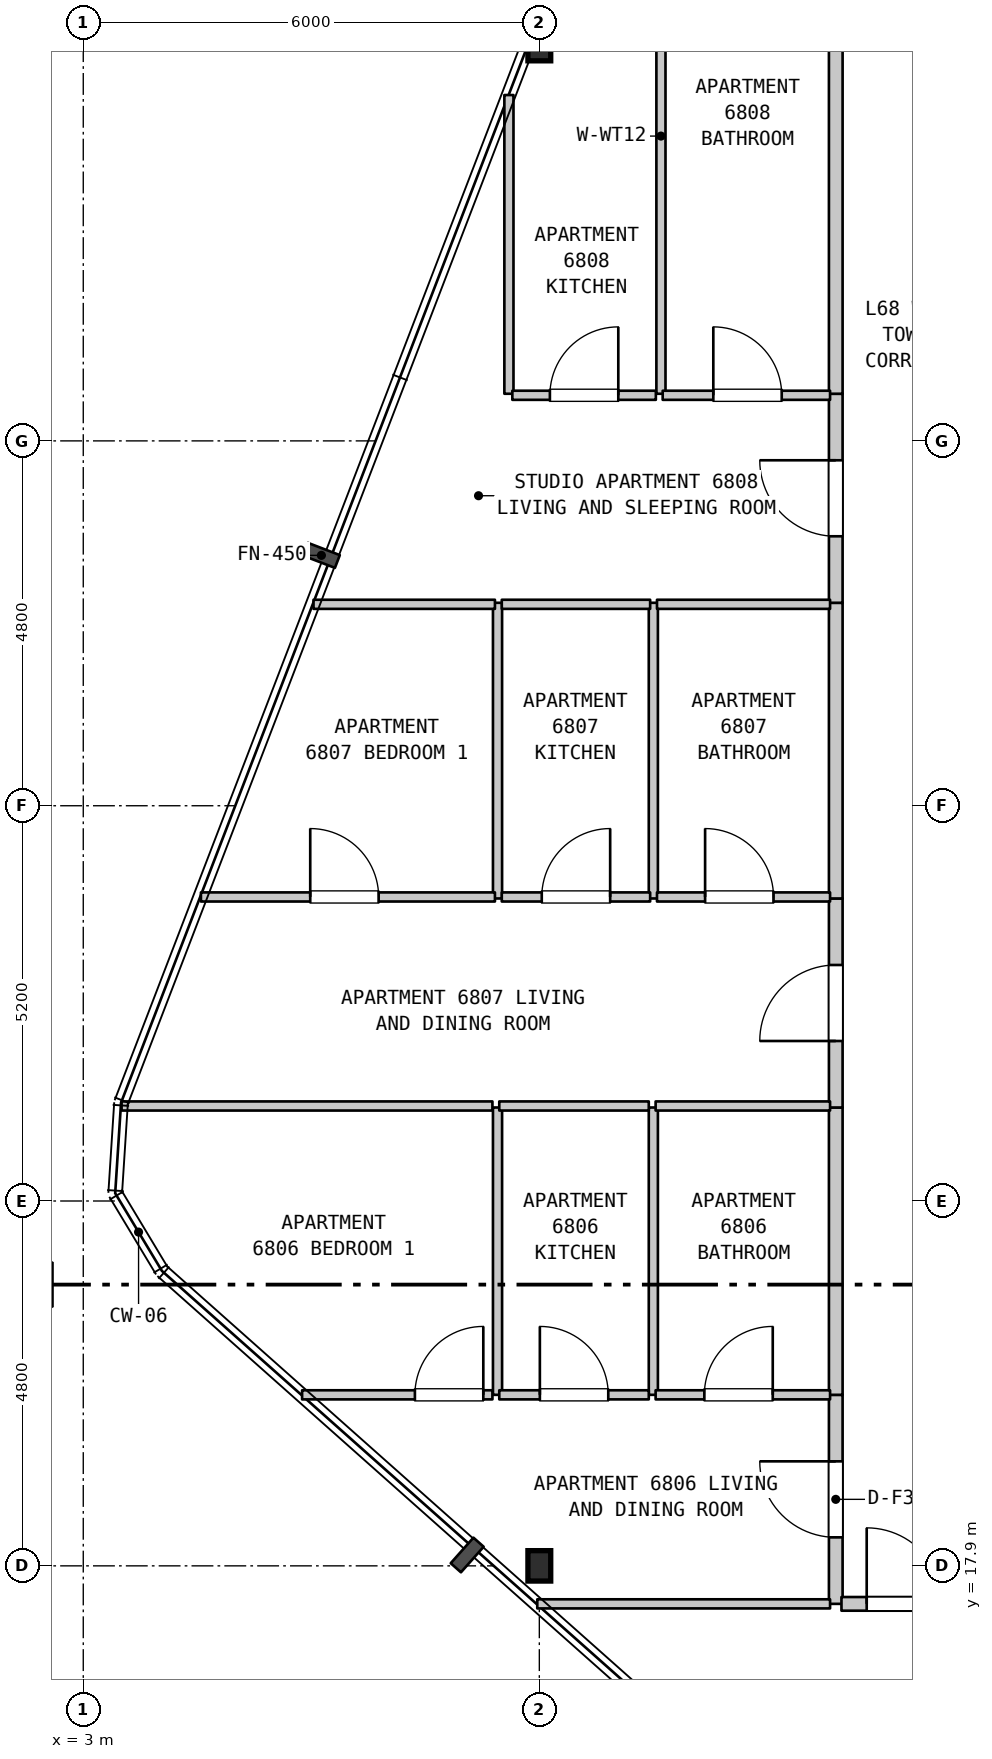
"""IFC4 building model, lengths in metres.
Left out: names, types, materials, properties, quantities, classifications, styles, units other than length and angle.
Written with IfcOpenShell. Run it as: python <this file> out.ifc"""

import sys

from ifc_helpers import new_model, si_unit, direction, frame, frame_2d, origin, origin_2d, place, context, subcontext, project, spatial, rectangle, i_section, extrude, element, fill, save


model = new_model("IFC4")
c1 = context("Model", 3, precision=1e-05, world=origin(), true_north=direction((0.0, 1.0)))
c2 = subcontext(c1, "Body", "Model", "MODEL_VIEW")
j1 = project(units=[si_unit("LENGTHUNIT", "METRE"), si_unit("PLANEANGLEUNIT", "RADIAN")], contexts=[c1])
p1 = place(None, origin())
s1 = spatial("IfcSite", under=j1, at=p1, CompositionType="ELEMENT")
p2 = place(p1, origin())
s2 = spatial("IfcBuilding", under=s1, at=p2, CompositionType="ELEMENT")
p3 = place(p2, frame((0.0, 0.0, 273.2)))
s3 = spatial("IfcBuildingStorey", under=s2, at=p3, CompositionType="ELEMENT", Elevation=273.2)
for number, where, z_axis, x_axis in (
    (1, (9.0, 17.9, 0.0), (0.0, 0.0, 1.0), (1.0, 0.0, 0.0)),
    (2, (9.0, 37.9, 0.0), (0.0, 0.0, 1.0), (1.0, 0.0, 0.0)),
):
    element("IfcColumn", number, at=place(p3, frame(where, z_axis=z_axis, x_axis=x_axis)), inside=s3, PredefinedType="COLUMN", context=c2, shape_type="SweptSolid", body=[
        extrude(i_section(OverallWidth=0.3, OverallDepth=0.4, WebThickness=0.013, FlangeThickness=0.024, FilletRadius=0.027, at=origin_2d()), origin(), (0.0, 0.0, 1.0), 3.7),
    ])
p4 = place(p3, frame((8.45, 20.15, 0.0), z_axis=(0.0, 0.0, 1.0), x_axis=(0.0, 1.0, 0.0)))
e3 = element("IfcWall", 3, at=p4, inside=s3, PredefinedType="PARTITIONING", context=c2, shape_type="SweptSolid", body=[
    extrude(rectangle(XDim=3.78, YDim=0.12, at=frame_2d((1.89, 0.0))), origin(), (0.0, 0.0, 1.0), 3.39),
])
p5 = place(p3, frame((8.45, 26.68, 0.0), z_axis=(0.0, 0.0, 1.0), x_axis=(0.0, 1.0, 0.0)))
e4 = element("IfcWall", 4, at=p5, inside=s3, PredefinedType="PARTITIONING", context=c2, shape_type="SweptSolid", body=[
    extrude(rectangle(XDim=3.89, YDim=0.12, at=frame_2d((1.945, 0.0))), origin(), (0.0, 0.0, 1.0), 3.39),
])
p6 = place(p3, frame((8.6, 33.32, 0.0), z_axis=(0.0, 0.0, 1.0), x_axis=(0.0, 1.0, 0.0)))
e5 = element("IfcWall", 5, at=p6, inside=s3, PredefinedType="PARTITIONING", context=c2, shape_type="SweptSolid", body=[
    extrude(rectangle(XDim=3.93, YDim=0.12, at=frame_2d((1.965, 0.0))), origin(), (0.0, 0.0, 1.0), 3.39),
])
p7 = place(p3, frame((10.5, 20.15, 0.0), z_axis=(0.0, 0.0, 1.0), x_axis=(0.0, 1.0, 0.0)))
e6 = element("IfcWall", 6, at=p7, inside=s3, PredefinedType="PARTITIONING", context=c2, shape_type="SweptSolid", body=[
    extrude(rectangle(XDim=3.78, YDim=0.12, at=frame_2d((1.89, 0.0))), origin(), (0.0, 0.0, 1.0), 3.39),
])
p8 = place(p3, frame((10.5, 26.68, 0.0), z_axis=(0.0, 0.0, 1.0), x_axis=(0.0, 1.0, 0.0)))
e7 = element("IfcWall", 7, at=p8, inside=s3, PredefinedType="PARTITIONING", context=c2, shape_type="SweptSolid", body=[
    extrude(rectangle(XDim=3.89, YDim=0.12, at=frame_2d((1.945, 0.0))), origin(), (0.0, 0.0, 1.0), 3.39),
])
p9 = place(p3, frame((10.6, 33.32, 0.0), z_axis=(0.0, 0.0, 1.0), x_axis=(0.0, 1.0, 0.0)))
e8 = element("IfcWall", 8, at=p9, inside=s3, PredefinedType="PARTITIONING", context=c2, shape_type="SweptSolid", body=[
    extrude(rectangle(XDim=6.78, YDim=0.12, at=frame_2d((3.39, 0.0))), origin(), (0.0, 0.0, 1.0), 3.39),
])
p10 = place(p3, frame((12.9, 17.4, 0.0), z_axis=(0.0, 0.0, 1.0), x_axis=(0.0, 1.0, 0.0)))
e9 = element("IfcWall", 9, at=p10, inside=s3, PredefinedType="STANDARD", context=c2, shape_type="SweptSolid", body=[
    extrude(rectangle(XDim=2.75, YDim=0.18, at=frame_2d((1.375, 0.0))), origin(), (0.0, 0.0, 1.0), 3.39),
])
p11 = place(p10, frame((0.875, 0.0, 0.0)))
e10 = element("IfcOpeningElement", 10, at=p11, cuts=e9, PredefinedType="OPENING", context=c2, shape_type="SweptSolid", body=[
    extrude(rectangle(XDim=1.0, YDim=2.15, at=frame_2d((0.5, 1.075))), frame((0.0, 0.1, 0.0), z_axis=(0.0, -1.0, 0.0), x_axis=(1.0, 0.0, 0.0)), (0.0, 0.0, 1.0), 0.2),
])
p12 = place(p3, frame((12.9, 20.15, 0.0), z_axis=(0.0, 0.0, 1.0), x_axis=(0.0, 1.0, 0.0)))
e11 = element("IfcWall", 11, at=p12, inside=s3, PredefinedType="STANDARD", context=c2, shape_type="SweptSolid", body=[
    extrude(rectangle(XDim=3.78, YDim=0.18, at=frame_2d((1.89, 0.0))), origin(), (0.0, 0.0, 1.0), 3.39),
])
p13 = place(p3, frame((12.9, 23.93, 0.0), z_axis=(0.0, 0.0, 1.0), x_axis=(0.0, 1.0, 0.0)))
e12 = element("IfcWall", 12, at=p13, inside=s3, PredefinedType="STANDARD", context=c2, shape_type="SweptSolid", body=[
    extrude(rectangle(XDim=2.75, YDim=0.18, at=frame_2d((1.375, 0.0))), origin(), (0.0, 0.0, 1.0), 3.39),
])
p14 = place(p13, frame((0.875, 0.0, 0.0)))
e13 = element("IfcOpeningElement", 13, at=p14, cuts=e12, PredefinedType="OPENING", context=c2, shape_type="SweptSolid", body=[
    extrude(rectangle(XDim=1.0, YDim=2.15, at=frame_2d((0.5, 1.075))), frame((0.0, 0.1, 0.0), z_axis=(0.0, -1.0, 0.0), x_axis=(1.0, 0.0, 0.0)), (0.0, 0.0, 1.0), 0.2),
])
p15 = place(p3, frame((12.9, 26.68, 0.0), z_axis=(0.0, 0.0, 1.0), x_axis=(0.0, 1.0, 0.0)))
e14 = element("IfcWall", 14, at=p15, inside=s3, PredefinedType="STANDARD", context=c2, shape_type="SweptSolid", body=[
    extrude(rectangle(XDim=3.89, YDim=0.18, at=frame_2d((1.945, 0.0))), origin(), (0.0, 0.0, 1.0), 3.39),
])
p16 = place(p3, frame((12.9, 30.57, 0.0), z_axis=(0.0, 0.0, 1.0), x_axis=(0.0, 1.0, 0.0)))
e15 = element("IfcWall", 15, at=p16, inside=s3, PredefinedType="STANDARD", context=c2, shape_type="SweptSolid", body=[
    extrude(rectangle(XDim=2.75, YDim=0.18, at=frame_2d((1.375, 0.0))), origin(), (0.0, 0.0, 1.0), 3.39),
])
p17 = place(p16, frame((0.875, 0.0, 0.0)))
e16 = element("IfcOpeningElement", 16, at=p17, cuts=e15, PredefinedType="OPENING", context=c2, shape_type="SweptSolid", body=[
    extrude(rectangle(XDim=1.0, YDim=2.15, at=frame_2d((0.5, 1.075))), frame((0.0, 0.1, 0.0), z_axis=(0.0, -1.0, 0.0), x_axis=(1.0, 0.0, 0.0)), (0.0, 0.0, 1.0), 0.2),
])
p18 = place(p3, frame((12.9, 33.32, 0.0), z_axis=(0.0, 0.0, 1.0), x_axis=(0.0, 1.0, 0.0)))
e17 = element("IfcWall", 17, at=p18, inside=s3, PredefinedType="STANDARD", context=c2, shape_type="SweptSolid", body=[
    extrude(rectangle(XDim=6.78, YDim=0.18, at=frame_2d((3.39, 0.0))), origin(), (0.0, 0.0, 1.0), 3.39),
])
p19 = place(p3, frame((8.973, 17.4, 0.0), z_axis=(0.0, 0.0, 1.0), x_axis=(1.0, 0.0, 0.0)))
e18 = element("IfcWall", 18, at=p19, inside=s3, PredefinedType="PARTITIONING", context=c2, shape_type="SweptSolid", body=[
    extrude(rectangle(XDim=3.852, YDim=0.12, at=frame_2d((1.926, 0.0))), origin(), (0.0, 0.0, 1.0), 3.39),
])
p20 = place(p3, frame((12.975, 17.4, 0.0), z_axis=(0.0, 0.0, 1.0), x_axis=(1.0, 0.0, 0.0)))
e19 = element("IfcWall", 19, at=p20, inside=s3, PredefinedType="STANDARD", context=c2, shape_type="SweptSolid", body=[
    extrude(rectangle(XDim=3.18, YDim=0.18, at=frame_2d((1.59, 0.0))), origin(), (0.0, 0.0, 1.0), 3.39),
])
p21 = place(p20, frame((0.332, 0.0, 0.0)))
e20 = element("IfcOpeningElement", 20, at=p21, cuts=e19, PredefinedType="OPENING", context=c2, shape_type="SweptSolid", body=[
    extrude(rectangle(XDim=1.0, YDim=2.15, at=frame_2d((0.5, 1.075))), frame((0.0, 0.1, 0.0), z_axis=(0.0, -1.0, 0.0), x_axis=(1.0, 0.0, 0.0)), (0.0, 0.0, 1.0), 0.2),
])
p22 = place(p3, frame((5.879, 20.15, 0.0), z_axis=(0.0, 0.0, 1.0), x_axis=(1.0, 0.0, 0.0)))
e21 = element("IfcWall", 21, at=p22, inside=s3, PredefinedType="PARTITIONING", context=c2, shape_type="SweptSolid", body=[
    extrude(rectangle(XDim=2.504, YDim=0.12, at=frame_2d((1.252, 0.0))), origin(), (0.0, 0.0, 1.0), 3.39),
])
p23 = place(p22, frame((1.484, 0.0, 0.0)))
e22 = element("IfcOpeningElement", 22, at=p23, cuts=e21, PredefinedType="OPENING", context=c2, shape_type="SweptSolid", body=[
    extrude(rectangle(XDim=0.9, YDim=2.15, at=frame_2d((0.45, 1.075))), frame((0.0, 0.07, 0.0), z_axis=(0.0, -1.0, 0.0), x_axis=(1.0, 0.0, 0.0)), (0.0, 0.0, 1.0), 0.14),
])
p24 = place(p3, frame((8.473, 20.15, 0.0), z_axis=(0.0, 0.0, 1.0), x_axis=(1.0, 0.0, 0.0)))
e23 = element("IfcWall", 23, at=p24, inside=s3, PredefinedType="PARTITIONING", context=c2, shape_type="SweptSolid", body=[
    extrude(rectangle(XDim=1.967, YDim=0.12, at=frame_2d((0.983, 0.0))), origin(), (0.0, 0.0, 1.0), 3.39),
])
p25 = place(p24, frame((0.534, 0.0, 0.0)))
e24 = element("IfcOpeningElement", 24, at=p25, cuts=e23, PredefinedType="OPENING", context=c2, shape_type="SweptSolid", body=[
    extrude(rectangle(XDim=0.9, YDim=2.15, at=frame_2d((0.45, 1.075))), frame((0.0, 0.07, 0.0), z_axis=(0.0, -1.0, 0.0), x_axis=(1.0, 0.0, 0.0)), (0.0, 0.0, 1.0), 0.14),
])
p26 = place(p3, frame((10.53, 20.15, 0.0), z_axis=(0.0, 0.0, 1.0), x_axis=(1.0, 0.0, 0.0)))
e25 = element("IfcWall", 25, at=p26, inside=s3, PredefinedType="PARTITIONING", context=c2, shape_type="SweptSolid", body=[
    extrude(rectangle(XDim=2.295, YDim=0.12, at=frame_2d((1.147, 0.0))), origin(), (0.0, 0.0, 1.0), 3.39),
])
p27 = place(p26, frame((0.641, 0.0, 0.0)))
e26 = element("IfcOpeningElement", 26, at=p27, cuts=e25, PredefinedType="OPENING", context=c2, shape_type="SweptSolid", body=[
    extrude(rectangle(XDim=0.9, YDim=2.1, at=frame_2d((0.45, 1.05))), frame((0.0, 0.07, 0.0), z_axis=(0.0, -1.0, 0.0), x_axis=(1.0, 0.0, 0.0)), (0.0, 0.0, 1.0), 0.14),
])
p28 = place(p3, frame((3.504, 23.95, 0.0), z_axis=(0.0, 0.0, 1.0), x_axis=(1.0, 0.0, 0.0)))
e27 = element("IfcWall", 27, at=p28, inside=s3, PredefinedType="PARTITIONING", context=c2, shape_type="SweptSolid", body=[
    extrude(rectangle(XDim=4.879, YDim=0.12, at=frame_2d((2.439, 0.0))), origin(), (0.0, 0.0, 1.0), 3.39),
])
p29 = place(p3, frame((8.473, 23.95, 0.0), z_axis=(0.0, 0.0, 1.0), x_axis=(1.0, 0.0, 0.0)))
e28 = element("IfcWall", 28, at=p29, inside=s3, PredefinedType="PARTITIONING", context=c2, shape_type="SweptSolid", body=[
    extrude(rectangle(XDim=1.967, YDim=0.12, at=frame_2d((0.983, 0.0))), origin(), (0.0, 0.0, 1.0), 3.39),
])
p30 = place(p3, frame((10.53, 23.95, 0.0), z_axis=(0.0, 0.0, 1.0), x_axis=(1.0, 0.0, 0.0)))
e29 = element("IfcWall", 29, at=p30, inside=s3, PredefinedType="PARTITIONING", context=c2, shape_type="SweptSolid", body=[
    extrude(rectangle(XDim=2.295, YDim=0.12, at=frame_2d((1.147, 0.0))), origin(), (0.0, 0.0, 1.0), 3.39),
])
p31 = place(p3, frame((4.548, 26.7, 0.0), z_axis=(0.0, 0.0, 1.0), x_axis=(1.0, 0.0, 0.0)))
e30 = element("IfcWall", 30, at=p31, inside=s3, PredefinedType="PARTITIONING", context=c2, shape_type="SweptSolid", body=[
    extrude(rectangle(XDim=3.868, YDim=0.12, at=frame_2d((1.934, 0.0))), origin(), (0.0, 0.0, 1.0), 3.39),
])
p32 = place(p31, frame((1.438, 0.0, 0.0)))
e31 = element("IfcOpeningElement", 31, at=p32, cuts=e30, PredefinedType="OPENING", context=c2, shape_type="SweptSolid", body=[
    extrude(rectangle(XDim=0.9, YDim=2.15, at=frame_2d((0.45, 1.075))), frame((0.0, 0.07, 0.0), z_axis=(0.0, -1.0, 0.0), x_axis=(1.0, 0.0, 0.0)), (0.0, 0.0, 1.0), 0.14),
])
p33 = place(p3, frame((8.506, 26.7, 0.0), z_axis=(0.0, 0.0, 1.0), x_axis=(1.0, 0.0, 0.0)))
e32 = element("IfcWall", 32, at=p33, inside=s3, PredefinedType="PARTITIONING", context=c2, shape_type="SweptSolid", body=[
    extrude(rectangle(XDim=1.952, YDim=0.12, at=frame_2d((0.976, 0.0))), origin(), (0.0, 0.0, 1.0), 3.39),
])
p34 = place(p33, frame((0.526, 0.0, 0.0)))
e33 = element("IfcOpeningElement", 33, at=p34, cuts=e32, PredefinedType="OPENING", context=c2, shape_type="SweptSolid", body=[
    extrude(rectangle(XDim=0.9, YDim=2.15, at=frame_2d((0.45, 1.075))), frame((0.0, 0.07, 0.0), z_axis=(0.0, -1.0, 0.0), x_axis=(1.0, 0.0, 0.0)), (0.0, 0.0, 1.0), 0.14),
])
p35 = place(p3, frame((10.548, 26.7, 0.0), z_axis=(0.0, 0.0, 1.0), x_axis=(1.0, 0.0, 0.0)))
e34 = element("IfcWall", 34, at=p35, inside=s3, PredefinedType="PARTITIONING", context=c2, shape_type="SweptSolid", body=[
    extrude(rectangle(XDim=2.277, YDim=0.12, at=frame_2d((1.138, 0.0))), origin(), (0.0, 0.0, 1.0), 3.39),
])
p36 = place(p35, frame((0.633, 0.0, 0.0)))
e35 = element("IfcOpeningElement", 35, at=p36, cuts=e34, PredefinedType="OPENING", context=c2, shape_type="SweptSolid", body=[
    extrude(rectangle(XDim=0.9, YDim=2.1, at=frame_2d((0.45, 1.05))), frame((0.0, 0.07, 0.0), z_axis=(0.0, -1.0, 0.0), x_axis=(1.0, 0.0, 0.0)), (0.0, 0.0, 1.0), 0.14),
])
p37 = place(p3, frame((6.029, 30.55, 0.0), z_axis=(0.0, 0.0, 1.0), x_axis=(1.0, 0.0, 0.0)))
e36 = element("IfcWall", 36, at=p37, inside=s3, PredefinedType="PARTITIONING", context=c2, shape_type="SweptSolid", body=[
    extrude(rectangle(XDim=2.387, YDim=0.12, at=frame_2d((1.193, 0.0))), origin(), (0.0, 0.0, 1.0), 3.39),
])
p38 = place(p3, frame((8.506, 30.55, 0.0), z_axis=(0.0, 0.0, 1.0), x_axis=(1.0, 0.0, 0.0)))
e37 = element("IfcWall", 37, at=p38, inside=s3, PredefinedType="PARTITIONING", context=c2, shape_type="SweptSolid", body=[
    extrude(rectangle(XDim=1.952, YDim=0.12, at=frame_2d((0.976, 0.0))), origin(), (0.0, 0.0, 1.0), 3.39),
])
p39 = place(p3, frame((10.548, 30.55, 0.0), z_axis=(0.0, 0.0, 1.0), x_axis=(1.0, 0.0, 0.0)))
e38 = element("IfcWall", 38, at=p39, inside=s3, PredefinedType="PARTITIONING", context=c2, shape_type="SweptSolid", body=[
    extrude(rectangle(XDim=2.277, YDim=0.12, at=frame_2d((1.138, 0.0))), origin(), (0.0, 0.0, 1.0), 3.39),
])
p40 = place(p3, frame((8.645, 33.3, 0.0), z_axis=(0.0, 0.0, 1.0), x_axis=(1.0, 0.0, 0.0)))
e39 = element("IfcWall", 39, at=p40, inside=s3, PredefinedType="PARTITIONING", context=c2, shape_type="SweptSolid", body=[
    extrude(rectangle(XDim=1.888, YDim=0.12, at=frame_2d((0.944, 0.0))), origin(), (0.0, 0.0, 1.0), 3.39),
])
p41 = place(p40, frame((0.494, 0.0, 0.0)))
e40 = element("IfcOpeningElement", 40, at=p41, cuts=e39, PredefinedType="OPENING", context=c2, shape_type="SweptSolid", body=[
    extrude(rectangle(XDim=0.9, YDim=2.15, at=frame_2d((0.45, 1.075))), frame((0.0, 0.07, 0.0), z_axis=(0.0, -1.0, 0.0), x_axis=(1.0, 0.0, 0.0)), (0.0, 0.0, 1.0), 0.14),
])
p42 = place(p3, frame((10.623, 33.3, 0.0), z_axis=(0.0, 0.0, 1.0), x_axis=(1.0, 0.0, 0.0)))
e41 = element("IfcWall", 41, at=p42, inside=s3, PredefinedType="PARTITIONING", context=c2, shape_type="SweptSolid", body=[
    extrude(rectangle(XDim=2.202, YDim=0.12, at=frame_2d((1.101, 0.0))), origin(), (0.0, 0.0, 1.0), 3.39),
])
p43 = place(p42, frame((0.666, 0.0, 0.0)))
e42 = element("IfcOpeningElement", 42, at=p43, cuts=e41, PredefinedType="OPENING", context=c2, shape_type="SweptSolid", body=[
    extrude(rectangle(XDim=0.9, YDim=2.1, at=frame_2d((0.45, 1.05))), frame((0.0, 0.07, 0.0), z_axis=(0.0, -1.0, 0.0), x_axis=(1.0, 0.0, 0.0)), (0.0, 0.0, 1.0), 0.14),
])
p44 = place(p11, origin())
e43 = element("IfcDoor", 43, at=p44, inside=s3, OperationType="SINGLE_SWING_RIGHT", PredefinedType="DOOR", context=c2, shape_type="SweptSolid", body=[
    extrude(rectangle(XDim=1.0, YDim=2.15, at=frame_2d((0.5, 1.075))), frame((0.0, 0.025, 0.0), z_axis=(0.0, -1.0, 0.0), x_axis=(1.0, 0.0, 0.0)), (0.0, 0.0, 1.0), 0.05),
])
fill(e10, e43)
p45 = place(p14, origin())
e44 = element("IfcDoor", 44, at=p45, inside=s3, OperationType="SINGLE_SWING_LEFT", PredefinedType="DOOR", context=c2, shape_type="SweptSolid", body=[
    extrude(rectangle(XDim=1.0, YDim=2.15, at=frame_2d((0.5, 1.075))), frame((0.0, 0.025, 0.0), z_axis=(0.0, -1.0, 0.0), x_axis=(1.0, 0.0, 0.0)), (0.0, 0.0, 1.0), 0.05),
])
fill(e13, e44)
p46 = place(p17, origin())
e45 = element("IfcDoor", 45, at=p46, inside=s3, OperationType="SINGLE_SWING_RIGHT", PredefinedType="DOOR", context=c2, shape_type="SweptSolid", body=[
    extrude(rectangle(XDim=1.0, YDim=2.15, at=frame_2d((0.5, 1.075))), frame((0.0, 0.025, 0.0), z_axis=(0.0, -1.0, 0.0), x_axis=(1.0, 0.0, 0.0)), (0.0, 0.0, 1.0), 0.05),
])
fill(e16, e45)
p47 = place(p21, origin())
e46 = element("IfcDoor", 46, at=p47, inside=s3, OperationType="SINGLE_SWING_LEFT", PredefinedType="DOOR", context=c2, shape_type="SweptSolid", body=[
    extrude(rectangle(XDim=1.0, YDim=2.15, at=frame_2d((0.5, 1.075))), frame((0.0, 0.025, 0.0), z_axis=(0.0, -1.0, 0.0), x_axis=(1.0, 0.0, 0.0)), (0.0, 0.0, 1.0), 0.05),
])
fill(e20, e46)
p48 = place(p23, origin())
e47 = element("IfcDoor", 47, at=p48, inside=s3, OperationType="SINGLE_SWING_RIGHT", PredefinedType="DOOR", context=c2, shape_type="SweptSolid", body=[
    extrude(rectangle(XDim=0.9, YDim=2.15, at=frame_2d((0.45, 1.075))), frame((0.0, 0.025, 0.0), z_axis=(0.0, -1.0, 0.0), x_axis=(1.0, 0.0, 0.0)), (0.0, 0.0, 1.0), 0.05),
])
fill(e22, e47)
p49 = place(p25, origin())
e48 = element("IfcDoor", 48, at=p49, inside=s3, OperationType="SINGLE_SWING_LEFT", PredefinedType="DOOR", context=c2, shape_type="SweptSolid", body=[
    extrude(rectangle(XDim=0.9, YDim=2.15, at=frame_2d((0.45, 1.075))), frame((0.0, 0.025, 0.0), z_axis=(0.0, -1.0, 0.0), x_axis=(1.0, 0.0, 0.0)), (0.0, 0.0, 1.0), 0.05),
])
fill(e24, e48)
p50 = place(p27, origin())
e49 = element("IfcDoor", 49, at=p50, inside=s3, OperationType="SINGLE_SWING_RIGHT", PredefinedType="DOOR", context=c2, shape_type="SweptSolid", body=[
    extrude(rectangle(XDim=0.9, YDim=2.1, at=frame_2d((0.45, 1.05))), frame((0.0, 0.025, 0.0), z_axis=(0.0, -1.0, 0.0), x_axis=(1.0, 0.0, 0.0)), (0.0, 0.0, 1.0), 0.05),
])
fill(e26, e49)
p51 = place(p32, origin())
e50 = element("IfcDoor", 50, at=p51, inside=s3, OperationType="SINGLE_SWING_LEFT", PredefinedType="DOOR", context=c2, shape_type="SweptSolid", body=[
    extrude(rectangle(XDim=0.9, YDim=2.15, at=frame_2d((0.45, 1.075))), frame((0.0, 0.025, 0.0), z_axis=(0.0, -1.0, 0.0), x_axis=(1.0, 0.0, 0.0)), (0.0, 0.0, 1.0), 0.05),
])
fill(e31, e50)
p52 = place(p34, origin())
e51 = element("IfcDoor", 51, at=p52, inside=s3, OperationType="SINGLE_SWING_RIGHT", PredefinedType="DOOR", context=c2, shape_type="SweptSolid", body=[
    extrude(rectangle(XDim=0.9, YDim=2.15, at=frame_2d((0.45, 1.075))), frame((0.0, 0.025, 0.0), z_axis=(0.0, -1.0, 0.0), x_axis=(1.0, 0.0, 0.0)), (0.0, 0.0, 1.0), 0.05),
])
fill(e33, e51)
p53 = place(p36, origin())
e52 = element("IfcDoor", 52, at=p53, inside=s3, OperationType="SINGLE_SWING_LEFT", PredefinedType="DOOR", context=c2, shape_type="SweptSolid", body=[
    extrude(rectangle(XDim=0.9, YDim=2.1, at=frame_2d((0.45, 1.05))), frame((0.0, 0.025, 0.0), z_axis=(0.0, -1.0, 0.0), x_axis=(1.0, 0.0, 0.0)), (0.0, 0.0, 1.0), 0.05),
])
fill(e35, e52)
p54 = place(p41, origin())
e53 = element("IfcDoor", 53, at=p54, inside=s3, OperationType="SINGLE_SWING_RIGHT", PredefinedType="DOOR", context=c2, shape_type="SweptSolid", body=[
    extrude(rectangle(XDim=0.9, YDim=2.15, at=frame_2d((0.45, 1.075))), frame((0.0, 0.025, 0.0), z_axis=(0.0, -1.0, 0.0), x_axis=(1.0, 0.0, 0.0)), (0.0, 0.0, 1.0), 0.05),
])
fill(e40, e53)
p55 = place(p43, origin())
e54 = element("IfcDoor", 54, at=p55, inside=s3, OperationType="SINGLE_SWING_LEFT", PredefinedType="DOOR", context=c2, shape_type="SweptSolid", body=[
    extrude(rectangle(XDim=0.9, YDim=2.1, at=frame_2d((0.45, 1.05))), frame((0.0, 0.025, 0.0), z_axis=(0.0, -1.0, 0.0), x_axis=(1.0, 0.0, 0.0)), (0.0, 0.0, 1.0), 0.05),
])
fill(e42, e54)
save(model, sys.argv[1])
